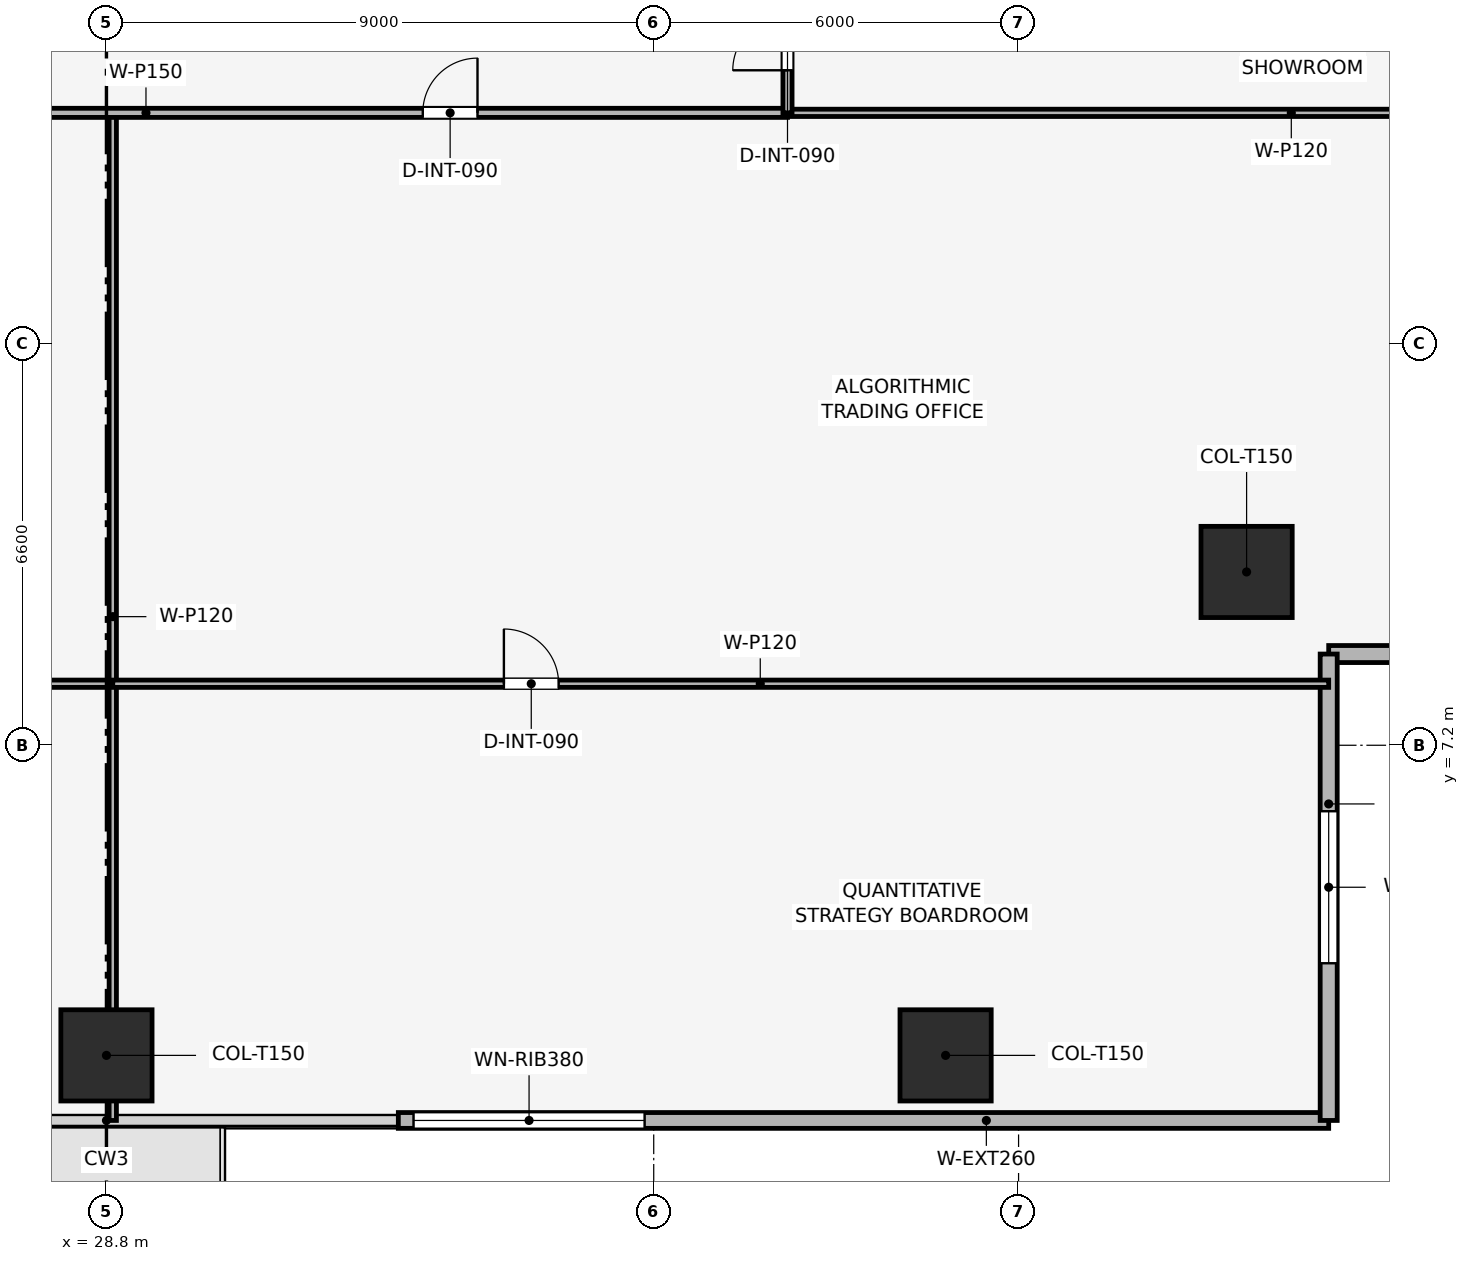
"""IFC4 building model, lengths in metres.
Left out: names, types, materials, properties, quantities, classifications, styles, units other than length and angle.
Written with IfcOpenShell. Run it as: python <this file> out.ifc"""

import sys

from ifc_helpers import new_model, si_unit, direction, frame, frame_2d, origin, origin_2d, place, context, subcontext, project, spatial, rectangle, extrude, element, fill, save


model = new_model("IFC4")
c1 = context("Model", 3, precision=1e-05, world=origin(), true_north=direction((0.0, 1.0)))
c2 = subcontext(c1, "Body", "Model", "MODEL_VIEW")
j1 = project(units=[si_unit("LENGTHUNIT", "METRE"), si_unit("PLANEANGLEUNIT", "RADIAN")], contexts=[c1])
p1 = place(None, origin())
s1 = spatial("IfcSite", under=j1, at=p1, CompositionType="ELEMENT")
p2 = place(p1, origin())
s2 = spatial("IfcBuilding", under=s1, at=p2, CompositionType="ELEMENT")
p3 = place(p2, frame((0.0, 0.0, 76.8)))
s3 = spatial("IfcBuildingStorey", under=s2, at=p3, CompositionType="ELEMENT", Elevation=76.8)
for number, where, z_axis, x_axis in (
    (1, (28.8, 2.1, 0.003), (0.0, 0.0, 1.0), (1.0, 0.0, 0.0)),
    (2, (42.6, 2.1, 0.003), (0.0, 0.0, 1.0), (1.0, 0.0, 0.0)),
    (3, (47.55, 10.05, 0.003), (0.0, 0.0, 1.0), (1.0, 0.0, 0.0)),
):
    element("IfcColumn", number, at=place(p3, frame(where, z_axis=z_axis, x_axis=x_axis)), inside=s3, PredefinedType="COLUMN", context=c2, shape_type="SweptSolid", body=[
        extrude(rectangle(XDim=1.5, YDim=1.5, at=origin_2d()), origin(), (0.0, 0.0, 1.0), 3.644),
    ])
p4 = place(p3, frame((48.9, 1.03, 0.0), z_axis=(0.0, 0.0, 1.0), x_axis=(-1.0, 0.0, 0.0)))
e4 = element("IfcWall", 4, at=p4, inside=s3, PredefinedType="SOLIDWALL", context=c2, shape_type="SweptSolid", body=[
    extrude(rectangle(XDim=15.3, YDim=0.26, at=frame_2d((7.65, 0.0))), origin(), (0.0, 0.0, 1.0), 3.65),
])
p5 = place(p4, frame((11.25, 0.0, 0.9)))
e5 = element("IfcOpeningElement", 5, at=p5, cuts=e4, PredefinedType="OPENING", context=c2, shape_type="SweptSolid", body=[
    extrude(rectangle(XDim=3.8, YDim=1.9, at=frame_2d((1.9, 0.95))), frame((0.0, 0.14, 0.0), z_axis=(0.0, -1.0, 0.0), x_axis=(1.0, 0.0, 0.0)), (0.0, 0.0, 1.0), 0.28),
])
p6 = place(p3, frame((56.57, 8.7, 0.0), z_axis=(0.0, 0.0, 1.0), x_axis=(-1.0, 0.0, 0.0)))
e6 = element("IfcWall", 6, at=p6, inside=s3, PredefinedType="SOLIDWALL", context=c2, shape_type="SweptSolid", body=[
    extrude(rectangle(XDim=7.67, YDim=0.28, at=frame_2d((3.835, 0.0))), origin(), (0.0, 0.0, 1.0), 3.65),
])
p7 = place(p6, frame((2.585, 0.0, 0.9)))
e7 = element("IfcOpeningElement", 7, at=p7, cuts=e6, PredefinedType="OPENING", context=c2, shape_type="SweptSolid", body=[
    extrude(rectangle(XDim=2.5, YDim=1.9, at=frame_2d((1.25, 0.95))), frame((0.0, 0.15, 0.0), z_axis=(0.0, -1.0, 0.0), x_axis=(1.0, 0.0, 0.0)), (0.0, 0.0, 1.0), 0.3),
])
p8 = place(p3, frame((48.9, 8.7, 0.0), z_axis=(0.0, 0.0, 1.0), x_axis=(0.0, -1.0, 0.0)))
e8 = element("IfcWall", 8, at=p8, inside=s3, PredefinedType="SOLIDWALL", context=c2, shape_type="SweptSolid", body=[
    extrude(rectangle(XDim=7.67, YDim=0.28, at=frame_2d((3.835, 0.0))), origin(), (0.0, 0.0, 1.0), 3.65),
])
p9 = place(p8, frame((2.585, 0.0, 0.9)))
e9 = element("IfcOpeningElement", 9, at=p9, cuts=e8, PredefinedType="OPENING", context=c2, shape_type="SweptSolid", body=[
    extrude(rectangle(XDim=2.5, YDim=1.9, at=frame_2d((1.25, 0.95))), frame((0.0, 0.15, 0.0), z_axis=(0.0, -1.0, 0.0), x_axis=(1.0, 0.0, 0.0)), (0.0, 0.0, 1.0), 0.3),
])
p10 = place(p3, frame((19.9, 8.212, 0.0), z_axis=(0.0, 0.0, 1.0), x_axis=(1.0, 0.0, 0.0)))
e10 = element("IfcWall", 10, at=p10, inside=s3, PredefinedType="PARTITIONING", context=c2, shape_type="SweptSolid", body=[
    extrude(rectangle(XDim=9.004, YDim=0.12, at=frame_2d((4.502, 0.0))), origin(), (0.0, 0.0, 1.0), 3.085),
])
p11 = place(p10, frame((1.484, 0.0, 0.0)))
e11 = element("IfcOpeningElement", 11, at=p11, cuts=e10, PredefinedType="OPENING", context=c2, shape_type="SweptSolid", body=[
    extrude(rectangle(XDim=0.9, YDim=2.1, at=frame_2d((0.45, 1.05))), frame((0.0, 0.07, 0.0), z_axis=(0.0, -1.0, 0.0), x_axis=(1.0, 0.0, 0.0)), (0.0, 0.0, 1.0), 0.14),
])
p12 = place(p3, frame((28.904, 1.03, 0.0), z_axis=(0.0, 0.0, 1.0), x_axis=(0.0, 1.0, 0.0)))
e12 = element("IfcWall", 12, at=p12, inside=s3, PredefinedType="PARTITIONING", context=c2, shape_type="SweptSolid", body=[
    extrude(rectangle(XDim=16.57, YDim=0.12, at=frame_2d((8.285, 0.0))), origin(), (0.0, 0.0, 1.0), 3.085),
])
p13 = place(p3, frame((28.904, 8.212, 0.0), z_axis=(0.0, 0.0, 1.0), x_axis=(1.0, 0.0, 0.0)))
e13 = element("IfcWall", 13, at=p13, inside=s3, PredefinedType="PARTITIONING", context=c2, shape_type="SweptSolid", body=[
    extrude(rectangle(XDim=19.996, YDim=0.12, at=frame_2d((9.998, 0.0))), origin(), (0.0, 0.0, 1.0), 2.935),
])
p14 = place(p13, frame((6.432, 0.0, 0.0)))
e14 = element("IfcOpeningElement", 14, at=p14, cuts=e13, PredefinedType="OPENING", context=c2, shape_type="SweptSolid", body=[
    extrude(rectangle(XDim=0.9, YDim=2.1, at=frame_2d((0.45, 1.05))), frame((0.0, 0.07, 0.0), z_axis=(0.0, -1.0, 0.0), x_axis=(1.0, 0.0, 0.0)), (0.0, 0.0, 1.0), 0.14),
])
p15 = place(p3, frame((40.0, 17.6, 0.0), z_axis=(0.0, 0.0, 1.0), x_axis=(1.0, 0.0, 0.0)))
e15 = element("IfcWall", 15, at=p15, inside=s3, PredefinedType="PARTITIONING", context=c2, shape_type="SweptSolid", body=[
    extrude(rectangle(XDim=16.57, YDim=0.12, at=frame_2d((8.285, 0.0))), origin(), (0.0, 0.0, 1.0), 2.935),
])
p16 = place(p3, frame((17.6, 17.6, 0.0), z_axis=(0.0, 0.0, 1.0), x_axis=(1.0, 0.0, 0.0)))
e16 = element("IfcWall", 16, at=p16, inside=s3, PredefinedType="PARTITIONING", context=c2, shape_type="SweptSolid", body=[
    extrude(rectangle(XDim=22.4, YDim=0.15, at=frame_2d((11.2, 0.0))), origin(), (0.0, 0.0, 1.0), 3.085),
])
p17 = place(p16, frame((0.7, 0.0, 0.0)))
e17 = element("IfcOpeningElement", 17, at=p17, cuts=e16, PredefinedType="OPENING", context=c2, shape_type="SweptSolid", body=[
    extrude(rectangle(XDim=0.9, YDim=2.1, at=frame_2d((0.45, 1.05))), frame((0.0, 0.085, 0.0), z_axis=(0.0, -1.0, 0.0), x_axis=(1.0, 0.0, 0.0)), (0.0, 0.0, 1.0), 0.17),
])
p18 = place(p16, frame((6.352, 0.0, 0.0)))
e18 = element("IfcOpeningElement", 18, at=p18, cuts=e16, PredefinedType="OPENING", context=c2, shape_type="SweptSolid", body=[
    extrude(rectangle(XDim=0.9, YDim=2.1, at=frame_2d((0.45, 1.05))), frame((0.0, 0.085, 0.0), z_axis=(0.0, -1.0, 0.0), x_axis=(1.0, 0.0, 0.0)), (0.0, 0.0, 1.0), 0.17),
])
p19 = place(p16, frame((16.402, 0.0, 0.0)))
e19 = element("IfcOpeningElement", 19, at=p19, cuts=e16, PredefinedType="OPENING", context=c2, shape_type="SweptSolid", body=[
    extrude(rectangle(XDim=0.9, YDim=2.1, at=frame_2d((0.45, 1.05))), frame((0.0, 0.085, 0.0), z_axis=(0.0, -1.0, 0.0), x_axis=(1.0, 0.0, 0.0)), (0.0, 0.0, 1.0), 0.17),
])
p20 = place(p3, frame((40.0, 17.6, 0.0), z_axis=(0.0, 0.0, 1.0), x_axis=(0.0, 1.0, 0.0)))
e20 = element("IfcWall", 20, at=p20, inside=s3, PredefinedType="PARTITIONING", context=c2, shape_type="SweptSolid", body=[
    extrude(rectangle(XDim=22.4, YDim=0.15, at=frame_2d((11.2, 0.0))), origin(), (0.0, 0.0, 1.0), 3.085),
])
p21 = place(p20, frame((0.7, 0.0, 0.0)))
e21 = element("IfcOpeningElement", 21, at=p21, cuts=e20, PredefinedType="OPENING", context=c2, shape_type="SweptSolid", body=[
    extrude(rectangle(XDim=0.9, YDim=2.1, at=frame_2d((0.45, 1.05))), frame((0.0, 0.085, 0.0), z_axis=(0.0, -1.0, 0.0), x_axis=(1.0, 0.0, 0.0)), (0.0, 0.0, 1.0), 0.17),
])
p22 = place(p20, frame((4.927, 0.0, 0.0)))
e22 = element("IfcOpeningElement", 22, at=p22, cuts=e20, PredefinedType="OPENING", context=c2, shape_type="SweptSolid", body=[
    extrude(rectangle(XDim=0.9, YDim=2.1, at=frame_2d((0.45, 1.05))), frame((0.0, 0.085, 0.0), z_axis=(0.0, -1.0, 0.0), x_axis=(1.0, 0.0, 0.0)), (0.0, 0.0, 1.0), 0.17),
])
p23 = place(p20, frame((10.886, 0.0, 0.0)))
e23 = element("IfcOpeningElement", 23, at=p23, cuts=e20, PredefinedType="OPENING", context=c2, shape_type="SweptSolid", body=[
    extrude(rectangle(XDim=0.9, YDim=2.1, at=frame_2d((0.45, 1.05))), frame((0.0, 0.085, 0.0), z_axis=(0.0, -1.0, 0.0), x_axis=(1.0, 0.0, 0.0)), (0.0, 0.0, 1.0), 0.17),
])
p24 = place(p20, frame((17.859, 0.0, 0.0)))
e24 = element("IfcOpeningElement", 24, at=p24, cuts=e20, PredefinedType="OPENING", context=c2, shape_type="SweptSolid", body=[
    extrude(rectangle(XDim=0.9, YDim=2.1, at=frame_2d((0.45, 1.05))), frame((0.0, 0.085, 0.0), z_axis=(0.0, -1.0, 0.0), x_axis=(1.0, 0.0, 0.0)), (0.0, 0.0, 1.0), 0.17),
])
p25 = place(p5, origin())
e25 = element("IfcWindow", 25, at=p25, inside=s3, PartitioningType="SINGLE_PANEL", PredefinedType="WINDOW", context=c2, shape_type="SweptSolid", body=[
    extrude(rectangle(XDim=3.8, YDim=1.9, at=frame_2d((1.9, 0.95))), frame((0.0, 0.03, 0.0), z_axis=(0.0, -1.0, 0.0), x_axis=(1.0, 0.0, 0.0)), (0.0, 0.0, 1.0), 0.06),
])
fill(e5, e25)
p26 = place(p9, origin())
e26 = element("IfcWindow", 26, at=p26, inside=s3, PartitioningType="SINGLE_PANEL", PredefinedType="WINDOW", context=c2, shape_type="SweptSolid", body=[
    extrude(rectangle(XDim=2.5, YDim=1.9, at=frame_2d((1.25, 0.95))), frame((0.0, 0.03, 0.0), z_axis=(0.0, -1.0, 0.0), x_axis=(1.0, 0.0, 0.0)), (0.0, 0.0, 1.0), 0.06),
])
fill(e9, e26)
p27 = place(p14, origin())
e27 = element("IfcDoor", 27, at=p27, inside=s3, OperationType="SINGLE_SWING_LEFT", PredefinedType="DOOR", context=c2, shape_type="SweptSolid", body=[
    extrude(rectangle(XDim=0.9, YDim=2.1, at=frame_2d((0.45, 1.05))), frame((0.0, 0.025, 0.0), z_axis=(0.0, -1.0, 0.0), x_axis=(1.0, 0.0, 0.0)), (0.0, 0.0, 1.0), 0.05),
])
fill(e14, e27)
p28 = place(p19, origin())
e28 = element("IfcDoor", 28, at=p28, inside=s3, OperationType="SINGLE_SWING_RIGHT", PredefinedType="DOOR", context=c2, shape_type="SweptSolid", body=[
    extrude(rectangle(XDim=0.9, YDim=2.1, at=frame_2d((0.45, 1.05))), frame((0.0, 0.025, 0.0), z_axis=(0.0, -1.0, 0.0), x_axis=(1.0, 0.0, 0.0)), (0.0, 0.0, 1.0), 0.05),
])
fill(e19, e28)
p29 = place(p21, origin())
e29 = element("IfcDoor", 29, at=p29, inside=s3, OperationType="SINGLE_SWING_LEFT", PredefinedType="DOOR", context=c2, shape_type="SweptSolid", body=[
    extrude(rectangle(XDim=0.9, YDim=2.1, at=frame_2d((0.45, 1.05))), frame((0.0, 0.025, 0.0), z_axis=(0.0, -1.0, 0.0), x_axis=(1.0, 0.0, 0.0)), (0.0, 0.0, 1.0), 0.05),
])
fill(e21, e29)
save(model, sys.argv[1])
